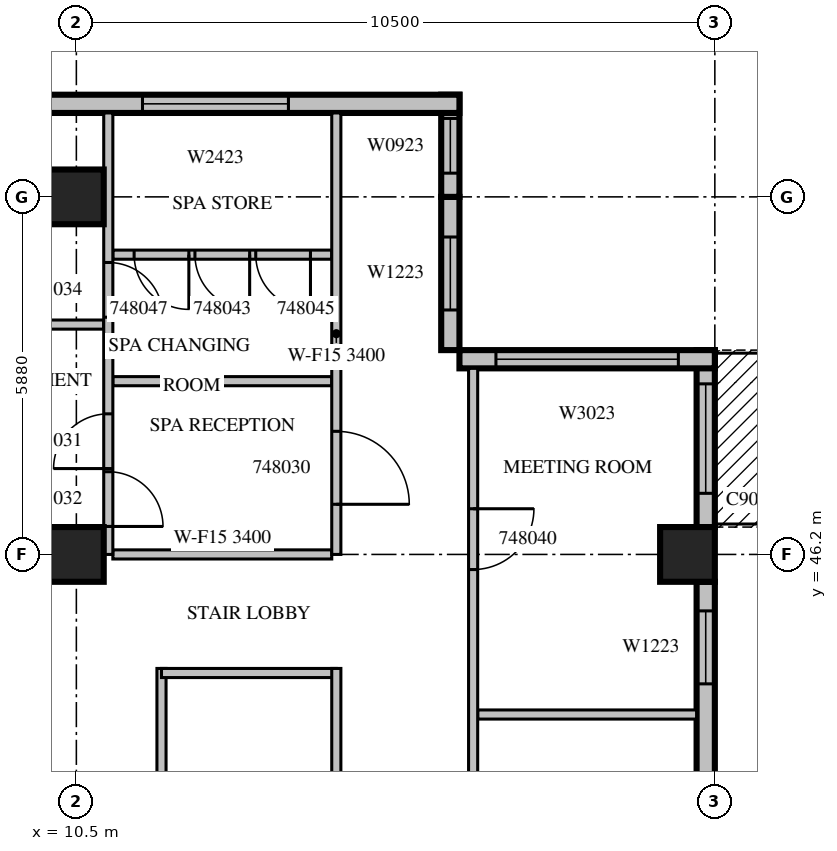
"""IFC4 building model, lengths in metres.
Left out: names, types, materials, properties, quantities, classifications, styles, units other than length and angle.
Written with IfcOpenShell. Run it as: python <this file> out.ifc"""

import sys

from ifc_helpers import new_model, si_unit, direction, frame, frame_2d, origin, origin_2d, place, context, subcontext, project, spatial, rectangle, extrude, source, transform, mapped, element, fill, save


model = new_model("IFC4")
c1 = context("Model", 3, precision=1e-05, world=origin(), true_north=direction((0.0, 1.0)))
c2 = subcontext(c1, "Body", "Model", "MODEL_VIEW")
j1 = project(units=[si_unit("LENGTHUNIT", "METRE"), si_unit("PLANEANGLEUNIT", "RADIAN")], contexts=[c1])
p1 = place(None, origin())
s1 = spatial("IfcSite", under=j1, at=p1, CompositionType="ELEMENT")
p2 = place(p1, origin())
s2 = spatial("IfcBuilding", under=s1, at=p2, CompositionType="ELEMENT")
p3 = place(p2, frame((0.0, 0.0, 215.8)))
s3 = spatial("IfcBuildingStorey", under=s2, at=p3, CompositionType="ELEMENT", Elevation=215.8)
m1 = source(origin(), c2, "Body", "SweptSolid", [
    extrude(rectangle(XDim=0.9, YDim=0.9, at=origin_2d()), origin(), (0.0, 0.0, 1.0), 3.8),
])
for number, where, z_axis, x_axis in (
    (1, (10.5, 46.2, 0.0), (0.0, 0.0, 1.0), (1.0, 0.0, 0.0)),
    (2, (20.55, 46.2, 0.0), (0.0, 0.0, 1.0), (1.0, 0.0, 0.0)),
    (3, (10.5, 52.08, 0.0), (0.0, 0.0, 1.0), (1.0, 0.0, 0.0)),
):
    element("IfcColumn", number, at=place(p3, frame(where, z_axis=z_axis, x_axis=x_axis)), inside=s3, PredefinedType="COLUMN", context=c2, shape_type="MappedRepresentation", body=[
        mapped(m1, transform((0.0, 0.0, 0.0), scale=1.0)),
    ])
m2 = source(origin(), c2, "Body", "SweptSolid", [
    extrude(rectangle(XDim=3.75, YDim=0.3, at=frame_2d((1.875, 0.0))), origin(), (0.0, 0.0, 1.0), 3.4),
])
p4 = place(p3, frame((20.85, 42.0, 0.0), z_axis=(0.0, 0.0, 1.0), x_axis=(0.0, 1.0, 0.0)))
e4 = element("IfcWall", 4, at=p4, inside=s3, PredefinedType="STANDARD", context=c2, shape_type="MappedRepresentation", body=[
    mapped(m2, transform((0.0, 0.0, 0.0), scale=1.0)),
])
m3 = source(origin(), c2, "Body", "SweptSolid", [
    extrude(rectangle(XDim=1.2, YDim=2.3, at=frame_2d((0.6, 1.15))), frame((0.0, 0.16, 0.0), z_axis=(0.0, -1.0, 0.0), x_axis=(1.0, 0.0, 0.0)), (0.0, 0.0, 1.0), 0.32),
])
p5 = place(p4, frame((2.071, 0.0, 0.6)))
e5 = element("IfcOpeningElement", 5, at=p5, cuts=e4, PredefinedType="OPENING", context=c2, shape_type="MappedRepresentation", body=[
    mapped(m3, transform((0.0, 0.0, 0.0), scale=1.0)),
])
m4 = source(origin(), c2, "Body", "SweptSolid", [
    extrude(rectangle(XDim=2.91, YDim=0.3, at=frame_2d((1.455, 0.0))), origin(), (0.0, 0.0, 1.0), 3.4),
])
p6 = place(p3, frame((20.85, 46.65, 0.0), z_axis=(0.0, 0.0, 1.0), x_axis=(0.0, 1.0, 0.0)))
e6 = element("IfcWall", 6, at=p6, inside=s3, PredefinedType="STANDARD", context=c2, shape_type="MappedRepresentation", body=[
    mapped(m4, transform((0.0, 0.0, 0.0), scale=1.0)),
])
m5 = source(origin(), c2, "Body", "SweptSolid", [
    extrude(rectangle(XDim=1.8, YDim=2.4, at=frame_2d((0.9, 1.2))), frame((0.0, 0.16, 0.0), z_axis=(0.0, -1.0, 0.0), x_axis=(1.0, 0.0, 0.0)), (0.0, 0.0, 1.0), 0.32),
])
p7 = place(p6, frame((0.555, 0.0, 0.0)))
e7 = element("IfcOpeningElement", 7, at=p7, cuts=e6, PredefinedType="OPENING", context=c2, shape_type="MappedRepresentation", body=[
    mapped(m5, transform((0.0, 0.0, 0.0), scale=1.0)),
])
m6 = source(origin(), c2, "Body", "SweptSolid", [
    extrude(rectangle(XDim=4.2, YDim=0.3, at=frame_2d((2.1, 0.0))), origin(), (0.0, 0.0, 1.0), 3.4),
])
p8 = place(p3, frame((21.0, 49.41, 0.0), z_axis=(0.0, 0.0, 1.0), x_axis=(-1.0, 0.0, 0.0)))
e8 = element("IfcWall", 8, at=p8, inside=s3, PredefinedType="STANDARD", context=c2, shape_type="MappedRepresentation", body=[
    mapped(m6, transform((0.0, 0.0, 0.0), scale=1.0)),
])
m7 = source(origin(), c2, "Body", "SweptSolid", [
    extrude(rectangle(XDim=3.0, YDim=2.3, at=frame_2d((1.5, 1.15))), frame((0.0, 0.16, 0.0), z_axis=(0.0, -1.0, 0.0), x_axis=(1.0, 0.0, 0.0)), (0.0, 0.0, 1.0), 0.32),
])
p9 = place(p8, frame((0.6, 0.0, 0.6)))
e9 = element("IfcOpeningElement", 9, at=p9, cuts=e8, PredefinedType="OPENING", context=c2, shape_type="MappedRepresentation", body=[
    mapped(m7, transform((0.0, 0.0, 0.0), scale=1.0)),
])
m8 = source(origin(), c2, "Body", "SweptSolid", [
    extrude(rectangle(XDim=2.52, YDim=0.3, at=frame_2d((1.26, 0.0))), origin(), (0.0, 0.0, 1.0), 3.4),
])
p10 = place(p3, frame((16.65, 49.56, 0.0), z_axis=(0.0, 0.0, 1.0), x_axis=(0.0, 1.0, 0.0)))
e10 = element("IfcWall", 10, at=p10, inside=s3, PredefinedType="STANDARD", context=c2, shape_type="MappedRepresentation", body=[
    mapped(m8, transform((0.0, 0.0, 0.0), scale=1.0)),
])
p11 = place(p10, frame((0.66, 0.0, 0.6)))
e11 = element("IfcOpeningElement", 11, at=p11, cuts=e10, PredefinedType="OPENING", context=c2, shape_type="MappedRepresentation", body=[
    mapped(m3, transform((0.0, 0.0, 0.0), scale=1.0)),
])
m9 = source(origin(), c2, "Body", "SweptSolid", [
    extrude(rectangle(XDim=1.68, YDim=0.3, at=frame_2d((0.84, 0.0))), origin(), (0.0, 0.0, 1.0), 3.4),
])
p12 = place(p3, frame((16.65, 52.08, 0.0), z_axis=(0.0, 0.0, 1.0), x_axis=(0.0, 1.0, 0.0)))
e12 = element("IfcWall", 12, at=p12, inside=s3, PredefinedType="STANDARD", context=c2, shape_type="MappedRepresentation", body=[
    mapped(m9, transform((0.0, 0.0, 0.0), scale=1.0)),
])
m10 = source(origin(), c2, "Body", "SweptSolid", [
    extrude(rectangle(XDim=0.9, YDim=2.3, at=frame_2d((0.45, 1.15))), frame((0.0, 0.16, 0.0), z_axis=(0.0, -1.0, 0.0), x_axis=(1.0, 0.0, 0.0)), (0.0, 0.0, 1.0), 0.32),
])
p13 = place(p12, frame((0.39, 0.0, 0.6)))
e13 = element("IfcOpeningElement", 13, at=p13, cuts=e12, PredefinedType="OPENING", context=c2, shape_type="MappedRepresentation", body=[
    mapped(m10, transform((0.0, 0.0, 0.0), scale=1.0)),
])
m11 = source(origin(), c2, "Body", "SweptSolid", [
    extrude(rectangle(XDim=10.5, YDim=0.3, at=frame_2d((5.25, 0.0))), origin(), (0.0, 0.0, 1.0), 3.4),
])
p14 = place(p3, frame((16.8, 53.61, 0.0), z_axis=(0.0, 0.0, 1.0), x_axis=(-1.0, 0.0, 0.0)))
e14 = element("IfcWall", 14, at=p14, inside=s3, PredefinedType="STANDARD", context=c2, shape_type="MappedRepresentation", body=[
    mapped(m11, transform((0.0, 0.0, 0.0), scale=1.0)),
])
m12 = source(origin(), c2, "Body", "SweptSolid", [
    extrude(rectangle(XDim=1.8, YDim=2.3, at=frame_2d((0.9, 1.15))), frame((0.0, 0.16, 0.0), z_axis=(0.0, -1.0, 0.0), x_axis=(1.0, 0.0, 0.0)), (0.0, 0.0, 1.0), 0.32),
])
p15 = place(p14, frame((8.025, 0.0, 0.6)))
e15 = element("IfcOpeningElement", 15, at=p15, cuts=e14, PredefinedType="OPENING", context=c2, shape_type="MappedRepresentation", body=[
    mapped(m12, transform((0.0, 0.0, 0.0), scale=1.0)),
])
m13 = source(origin(), c2, "Body", "SweptSolid", [
    extrude(rectangle(XDim=2.4, YDim=2.3, at=frame_2d((1.2, 1.15))), frame((0.0, 0.16, 0.0), z_axis=(0.0, -1.0, 0.0), x_axis=(1.0, 0.0, 0.0)), (0.0, 0.0, 1.0), 0.32),
])
p16 = place(p14, frame((2.812, 0.0, 0.6)))
e16 = element("IfcOpeningElement", 16, at=p16, cuts=e14, PredefinedType="OPENING", context=c2, shape_type="MappedRepresentation", body=[
    mapped(m13, transform((0.0, 0.0, 0.0), scale=1.0)),
])
m14 = source(origin(), c2, "Body", "SweptSolid", [
    extrude(rectangle(XDim=6.45, YDim=0.15, at=frame_2d((3.225, 0.0))), origin(), (0.0, 0.0, 1.0), 3.4),
])
p17 = place(p3, frame((11.9, 44.325, 0.0), z_axis=(0.0, 0.0, 1.0), x_axis=(0.0, -1.0, 0.0)))
e17 = element("IfcWall", 17, at=p17, inside=s3, PredefinedType="PARTITIONING", context=c2, shape_type="MappedRepresentation", body=[
    mapped(m14, transform((0.0, 0.0, 0.0), scale=1.0)),
])
m15 = source(origin(), c2, "Body", "SweptSolid", [
    extrude(rectangle(XDim=2.875, YDim=0.15, at=frame_2d((1.438, 0.0))), origin(), (0.0, 0.0, 1.0), 3.4),
])
p18 = place(p3, frame((14.775, 44.25, 0.0), z_axis=(0.0, 0.0, 1.0), x_axis=(-1.0, 0.0, 0.0)))
e18 = element("IfcWall", 18, at=p18, inside=s3, PredefinedType="PARTITIONING", context=c2, shape_type="MappedRepresentation", body=[
    mapped(m15, transform((0.0, 0.0, 0.0), scale=1.0)),
])
p19 = place(p3, frame((14.775, 37.875, 0.0), z_axis=(0.0, 0.0, 1.0), x_axis=(0.0, 1.0, 0.0)))
e19 = element("IfcWall", 19, at=p19, inside=s3, PredefinedType="PARTITIONING", context=c2, shape_type="MappedRepresentation", body=[
    mapped(m14, transform((0.0, 0.0, 0.0), scale=1.0)),
])
m16 = source(origin(), c2, "Body", "SweptSolid", [
    extrude(rectangle(XDim=0.9, YDim=2.1, at=frame_2d((0.45, 1.05))), frame((0.0, 0.085, 0.0), z_axis=(0.0, -1.0, 0.0), x_axis=(1.0, 0.0, 0.0)), (0.0, 0.0, 1.0), 0.17),
])
p20 = place(p19, frame((2.737, 0.0, 0.0)))
e20 = element("IfcOpeningElement", 20, at=p20, cuts=e19, PredefinedType="OPENING", context=c2, shape_type="MappedRepresentation", body=[
    mapped(m16, transform((0.0, 0.0, 0.0), scale=1.0)),
])
m17 = source(origin(), c2, "Body", "SweptSolid", [
    extrude(rectangle(XDim=4.445, YDim=0.15, at=frame_2d((2.223, 0.0))), origin(), (0.0, 0.0, 1.0), 3.4),
])
p21 = place(p3, frame((10.95, 49.98, 0.0), z_axis=(0.0, 0.0, 1.0), x_axis=(-1.0, 0.0, 0.0)))
e21 = element("IfcWall", 21, at=p21, inside=s3, PredefinedType="PARTITIONING", context=c2, shape_type="MappedRepresentation", body=[
    mapped(m17, transform((0.0, 0.0, 0.0), scale=1.0)),
])
m18 = source(origin(), c2, "Body", "SweptSolid", [
    extrude(rectangle(XDim=1.0, YDim=2.1, at=frame_2d((0.5, 1.05))), frame((0.0, 0.085, 0.0), z_axis=(0.0, -1.0, 0.0), x_axis=(1.0, 0.0, 0.0)), (0.0, 0.0, 1.0), 0.17),
])
p22 = place(p21, frame((3.325, 0.0, 0.0)))
e22 = element("IfcOpeningElement", 22, at=p22, cuts=e21, PredefinedType="OPENING", context=c2, shape_type="MappedRepresentation", body=[
    mapped(m18, transform((0.0, 0.0, 0.0), scale=1.0)),
])
m19 = source(origin(), c2, "Body", "SweptSolid", [
    extrude(rectangle(XDim=3.6, YDim=0.15, at=frame_2d((1.8, 0.0))), origin(), (0.0, 0.0, 1.0), 3.4),
])
p23 = place(p3, frame((14.7, 49.049, 0.0), z_axis=(0.0, 0.0, 1.0), x_axis=(-1.0, 0.0, 0.0)))
e23 = element("IfcWall", 23, at=p23, inside=s3, PredefinedType="PARTITIONING", context=c2, shape_type="MappedRepresentation", body=[
    mapped(m19, transform((0.0, 0.0, 0.0), scale=1.0)),
])
p24 = place(p3, frame((14.7, 51.13, 0.0), z_axis=(0.0, 0.0, 1.0), x_axis=(-1.0, 0.0, 0.0)))
e24 = element("IfcWall", 24, at=p24, inside=s3, PredefinedType="PARTITIONING", context=c2, shape_type="MappedRepresentation", body=[
    mapped(m19, transform((0.0, 0.0, 0.0), scale=1.0)),
])
p25 = place(p24, frame((1.35, 0.0, 0.0)))
e25 = element("IfcOpeningElement", 25, at=p25, cuts=e24, PredefinedType="OPENING", context=c2, shape_type="MappedRepresentation", body=[
    mapped(m16, transform((0.0, 0.0, 0.0), scale=1.0)),
])
p26 = place(p24, frame((0.35, 0.0, 0.0)))
e26 = element("IfcOpeningElement", 26, at=p26, cuts=e24, PredefinedType="OPENING", context=c2, shape_type="MappedRepresentation", body=[
    mapped(m16, transform((0.0, 0.0, 0.0), scale=1.0)),
])
p27 = place(p24, frame((2.35, 0.0, 0.0)))
e27 = element("IfcOpeningElement", 27, at=p27, cuts=e24, PredefinedType="OPENING", context=c2, shape_type="MappedRepresentation", body=[
    mapped(m16, transform((0.0, 0.0, 0.0), scale=1.0)),
])
p28 = place(p3, frame((14.7, 46.2, 0.0), z_axis=(0.0, 0.0, 1.0), x_axis=(-1.0, 0.0, 0.0)))
e28 = element("IfcWall", 28, at=p28, inside=s3, PredefinedType="PARTITIONING", context=c2, shape_type="MappedRepresentation", body=[
    mapped(m19, transform((0.0, 0.0, 0.0), scale=1.0)),
])
m20 = source(origin(), c2, "Body", "SweptSolid", [
    extrude(rectangle(XDim=7.26, YDim=0.15, at=frame_2d((3.63, 0.0))), origin(), (0.0, 0.0, 1.0), 3.4),
])
p29 = place(p3, frame((11.025, 46.2, 0.0), z_axis=(0.0, 0.0, 1.0), x_axis=(0.0, 1.0, 0.0)))
e29 = element("IfcWall", 29, at=p29, inside=s3, PredefinedType="PARTITIONING", context=c2, shape_type="MappedRepresentation", body=[
    mapped(m20, transform((0.0, 0.0, 0.0), scale=1.0)),
])
p30 = place(p29, frame((1.412, 0.0, 0.0)))
e30 = element("IfcOpeningElement", 30, at=p30, cuts=e29, PredefinedType="OPENING", context=c2, shape_type="MappedRepresentation", body=[
    mapped(m16, transform((0.0, 0.0, 0.0), scale=1.0)),
])
p31 = place(p29, frame((0.46, 0.0, 0.0)))
e31 = element("IfcOpeningElement", 31, at=p31, cuts=e29, PredefinedType="OPENING", context=c2, shape_type="MappedRepresentation", body=[
    mapped(m16, transform((0.0, 0.0, 0.0), scale=1.0)),
])
p32 = place(p29, frame((3.901, 0.0, 0.0)))
e32 = element("IfcOpeningElement", 32, at=p32, cuts=e29, PredefinedType="OPENING", context=c2, shape_type="MappedRepresentation", body=[
    mapped(m16, transform((0.0, 0.0, 0.0), scale=1.0)),
])
p33 = place(p3, frame((17.1, 43.568, 0.0), z_axis=(0.0, 0.0, 1.0), x_axis=(1.0, 0.0, 0.0)))
e33 = element("IfcWall", 33, at=p33, inside=s3, PredefinedType="PARTITIONING", context=c2, shape_type="MappedRepresentation", body=[
    mapped(m19, transform((0.0, 0.0, 0.0), scale=1.0)),
])
p34 = place(p3, frame((14.775, 46.2, 0.0), z_axis=(0.0, 0.0, 1.0), x_axis=(0.0, 1.0, 0.0)))
e34 = element("IfcWall", 34, at=p34, inside=s3, PredefinedType="PARTITIONING", context=c2, shape_type="MappedRepresentation", body=[
    mapped(m20, transform((0.0, 0.0, 0.0), scale=1.0)),
])
m21 = source(origin(), c2, "Body", "SweptSolid", [
    extrude(rectangle(XDim=1.2, YDim=2.1, at=frame_2d((0.6, 1.05))), frame((0.0, 0.085, 0.0), z_axis=(0.0, -1.0, 0.0), x_axis=(1.0, 0.0, 0.0)), (0.0, 0.0, 1.0), 0.17),
])
p35 = place(p34, frame((0.825, 0.0, 0.0)))
e35 = element("IfcOpeningElement", 35, at=p35, cuts=e34, PredefinedType="OPENING", context=c2, shape_type="MappedRepresentation", body=[
    mapped(m21, transform((0.0, 0.0, 0.0), scale=1.0)),
])
m22 = source(origin(), c2, "Body", "SweptSolid", [
    extrude(rectangle(XDim=19.86, YDim=0.15, at=frame_2d((9.93, 0.0))), origin(), (0.0, 0.0, 1.0), 2.9),
])
p36 = place(p3, frame((17.025, 49.26, 0.0), z_axis=(0.0, 0.0, 1.0), x_axis=(0.0, -1.0, 0.0)))
e36 = element("IfcWall", 36, at=p36, inside=s3, PredefinedType="PARTITIONING", context=c2, shape_type="MappedRepresentation", body=[
    mapped(m22, transform((0.0, 0.0, 0.0), scale=1.0)),
])
p37 = place(p36, frame((18.076, 0.0, 0.0)))
e37 = element("IfcOpeningElement", 37, at=p37, cuts=e36, PredefinedType="OPENING", context=c2, shape_type="MappedRepresentation", body=[
    mapped(m16, transform((0.0, 0.0, 0.0), scale=1.0)),
])
p38 = place(p36, frame((15.976, 0.0, 0.0)))
e38 = element("IfcOpeningElement", 38, at=p38, cuts=e36, PredefinedType="OPENING", context=c2, shape_type="MappedRepresentation", body=[
    mapped(m16, transform((0.0, 0.0, 0.0), scale=1.0)),
])
p39 = place(p36, frame((13.766, 0.0, 0.0)))
e39 = element("IfcOpeningElement", 39, at=p39, cuts=e36, PredefinedType="OPENING", context=c2, shape_type="MappedRepresentation", body=[
    mapped(m18, transform((0.0, 0.0, 0.0), scale=1.0)),
])
p40 = place(p36, frame((11.716, 0.0, 0.0)))
e40 = element("IfcOpeningElement", 40, at=p40, cuts=e36, PredefinedType="OPENING", context=c2, shape_type="MappedRepresentation", body=[
    mapped(m16, transform((0.0, 0.0, 0.0), scale=1.0)),
])
p41 = place(p36, frame((8.076, 0.0, 0.0)))
e41 = element("IfcOpeningElement", 41, at=p41, cuts=e36, PredefinedType="OPENING", context=c2, shape_type="MappedRepresentation", body=[
    mapped(m18, transform((0.0, 0.0, 0.0), scale=1.0)),
])
p42 = place(p36, frame((2.309, 0.0, 0.0)))
e42 = element("IfcOpeningElement", 42, at=p42, cuts=e36, PredefinedType="OPENING", context=c2, shape_type="MappedRepresentation", body=[
    mapped(m18, transform((0.0, 0.0, 0.0), scale=1.0)),
])
m23 = source(origin(), c2, "Body", "SweptSolid", [
    extrude(rectangle(XDim=1.2, YDim=2.3, at=frame_2d((0.6, 1.15))), frame((0.0, 0.03, 0.0), z_axis=(0.0, -1.0, 0.0), x_axis=(1.0, 0.0, 0.0)), (0.0, 0.0, 1.0), 0.06),
])
p43 = place(p5, origin())
e43 = element("IfcWindow", 43, at=p43, inside=s3, PartitioningType="SINGLE_PANEL", PredefinedType="WINDOW", context=c2, shape_type="MappedRepresentation", body=[
    mapped(m23, transform((0.0, 0.0, 0.0), scale=1.0)),
])
fill(e5, e43)
m24 = source(origin(), c2, "Body", "SweptSolid", [
    extrude(rectangle(XDim=1.8, YDim=2.4, at=frame_2d((0.9, 1.2))), frame((0.0, 0.025, 0.0), z_axis=(0.0, -1.0, 0.0), x_axis=(1.0, 0.0, 0.0)), (0.0, 0.0, 1.0), 0.05),
])
p44 = place(p7, origin())
e44 = element("IfcDoor", 44, at=p44, inside=s3, OperationType="SLIDING_TO_LEFT", PredefinedType="DOOR", context=c2, shape_type="MappedRepresentation", body=[
    mapped(m24, transform((0.0, 0.0, 0.0), scale=1.0)),
])
fill(e7, e44)
m25 = source(origin(), c2, "Body", "SweptSolid", [
    extrude(rectangle(XDim=3.0, YDim=2.3, at=frame_2d((1.5, 1.15))), frame((0.0, 0.03, 0.0), z_axis=(0.0, -1.0, 0.0), x_axis=(1.0, 0.0, 0.0)), (0.0, 0.0, 1.0), 0.06),
])
p45 = place(p9, origin())
e45 = element("IfcWindow", 45, at=p45, inside=s3, PartitioningType="SINGLE_PANEL", PredefinedType="WINDOW", context=c2, shape_type="MappedRepresentation", body=[
    mapped(m25, transform((0.0, 0.0, 0.0), scale=1.0)),
])
fill(e9, e45)
p46 = place(p11, origin())
e46 = element("IfcWindow", 46, at=p46, inside=s3, PartitioningType="SINGLE_PANEL", PredefinedType="WINDOW", context=c2, shape_type="MappedRepresentation", body=[
    mapped(m23, transform((0.0, 0.0, 0.0), scale=1.0)),
])
fill(e11, e46)
m26 = source(origin(), c2, "Body", "SweptSolid", [
    extrude(rectangle(XDim=0.9, YDim=2.3, at=frame_2d((0.45, 1.15))), frame((0.0, 0.03, 0.0), z_axis=(0.0, -1.0, 0.0), x_axis=(1.0, 0.0, 0.0)), (0.0, 0.0, 1.0), 0.06),
])
p47 = place(p13, origin())
e47 = element("IfcWindow", 47, at=p47, inside=s3, PartitioningType="SINGLE_PANEL", PredefinedType="WINDOW", context=c2, shape_type="MappedRepresentation", body=[
    mapped(m26, transform((0.0, 0.0, 0.0), scale=1.0)),
])
fill(e13, e47)
m27 = source(origin(), c2, "Body", "SweptSolid", [
    extrude(rectangle(XDim=2.4, YDim=2.3, at=frame_2d((1.2, 1.15))), frame((0.0, 0.03, 0.0), z_axis=(0.0, -1.0, 0.0), x_axis=(1.0, 0.0, 0.0)), (0.0, 0.0, 1.0), 0.06),
])
p48 = place(p16, origin())
e48 = element("IfcWindow", 48, at=p48, inside=s3, PartitioningType="SINGLE_PANEL", PredefinedType="WINDOW", context=c2, shape_type="MappedRepresentation", body=[
    mapped(m27, transform((0.0, 0.0, 0.0), scale=1.0)),
])
fill(e16, e48)
m28 = source(origin(), c2, "Body", "SweptSolid", [
    extrude(rectangle(XDim=1.2, YDim=2.1, at=frame_2d((0.6, 1.05))), frame((0.0, 0.025, 0.0), z_axis=(0.0, -1.0, 0.0), x_axis=(1.0, 0.0, 0.0)), (0.0, 0.0, 1.0), 0.05),
])
p49 = place(p35, origin())
e49 = element("IfcDoor", 49, at=p49, inside=s3, OperationType="SINGLE_SWING_RIGHT", PredefinedType="DOOR", context=c2, shape_type="MappedRepresentation", body=[
    mapped(m28, transform((0.0, 0.0, 0.0), scale=1.0)),
])
fill(e35, e49)
m29 = source(origin(), c2, "Body", "SweptSolid", [
    extrude(rectangle(XDim=0.9, YDim=2.1, at=frame_2d((0.45, 1.05))), frame((0.0, 0.025, 0.0), z_axis=(0.0, -1.0, 0.0), x_axis=(1.0, 0.0, 0.0)), (0.0, 0.0, 1.0), 0.05),
])
p50 = place(p30, origin())
e50 = element("IfcDoor", 50, at=p50, inside=s3, OperationType="SINGLE_SWING_LEFT", PredefinedType="DOOR", context=c2, shape_type="MappedRepresentation", body=[
    mapped(m29, transform((0.0, 0.0, 0.0), scale=1.0)),
])
fill(e30, e50)
p51 = place(p31, origin())
e51 = element("IfcDoor", 51, at=p51, inside=s3, OperationType="SINGLE_SWING_RIGHT", PredefinedType="DOOR", context=c2, shape_type="MappedRepresentation", body=[
    mapped(m29, transform((0.0, 0.0, 0.0), scale=1.0)),
])
fill(e31, e51)
p52 = place(p32, origin())
e52 = element("IfcDoor", 52, at=p52, inside=s3, OperationType="SINGLE_SWING_RIGHT", PredefinedType="DOOR", context=c2, shape_type="MappedRepresentation", body=[
    mapped(m29, transform((0.0, 0.0, 0.0), scale=1.0)),
])
fill(e32, e52)
m30 = source(origin(), c2, "Body", "SweptSolid", [
    extrude(rectangle(XDim=1.0, YDim=2.1, at=frame_2d((0.5, 1.05))), frame((0.0, 0.025, 0.0), z_axis=(0.0, -1.0, 0.0), x_axis=(1.0, 0.0, 0.0)), (0.0, 0.0, 1.0), 0.05),
])
p53 = place(p42, origin())
e53 = element("IfcDoor", 53, at=p53, inside=s3, OperationType="SINGLE_SWING_LEFT", PredefinedType="DOOR", context=c2, shape_type="MappedRepresentation", body=[
    mapped(m30, transform((0.0, 0.0, 0.0), scale=1.0)),
])
fill(e42, e53)
p54 = place(p25, origin())
e54 = element("IfcDoor", 54, at=p54, inside=s3, OperationType="SINGLE_SWING_LEFT", PredefinedType="DOOR", context=c2, shape_type="MappedRepresentation", body=[
    mapped(m29, transform((0.0, 0.0, 0.0), scale=1.0)),
])
fill(e25, e54)
p55 = place(p26, origin())
e55 = element("IfcDoor", 55, at=p55, inside=s3, OperationType="SINGLE_SWING_LEFT", PredefinedType="DOOR", context=c2, shape_type="MappedRepresentation", body=[
    mapped(m29, transform((0.0, 0.0, 0.0), scale=1.0)),
])
fill(e26, e55)
p56 = place(p27, origin())
e56 = element("IfcDoor", 56, at=p56, inside=s3, OperationType="SINGLE_SWING_LEFT", PredefinedType="DOOR", context=c2, shape_type="MappedRepresentation", body=[
    mapped(m29, transform((0.0, 0.0, 0.0), scale=1.0)),
])
fill(e27, e56)
save(model, sys.argv[1])
